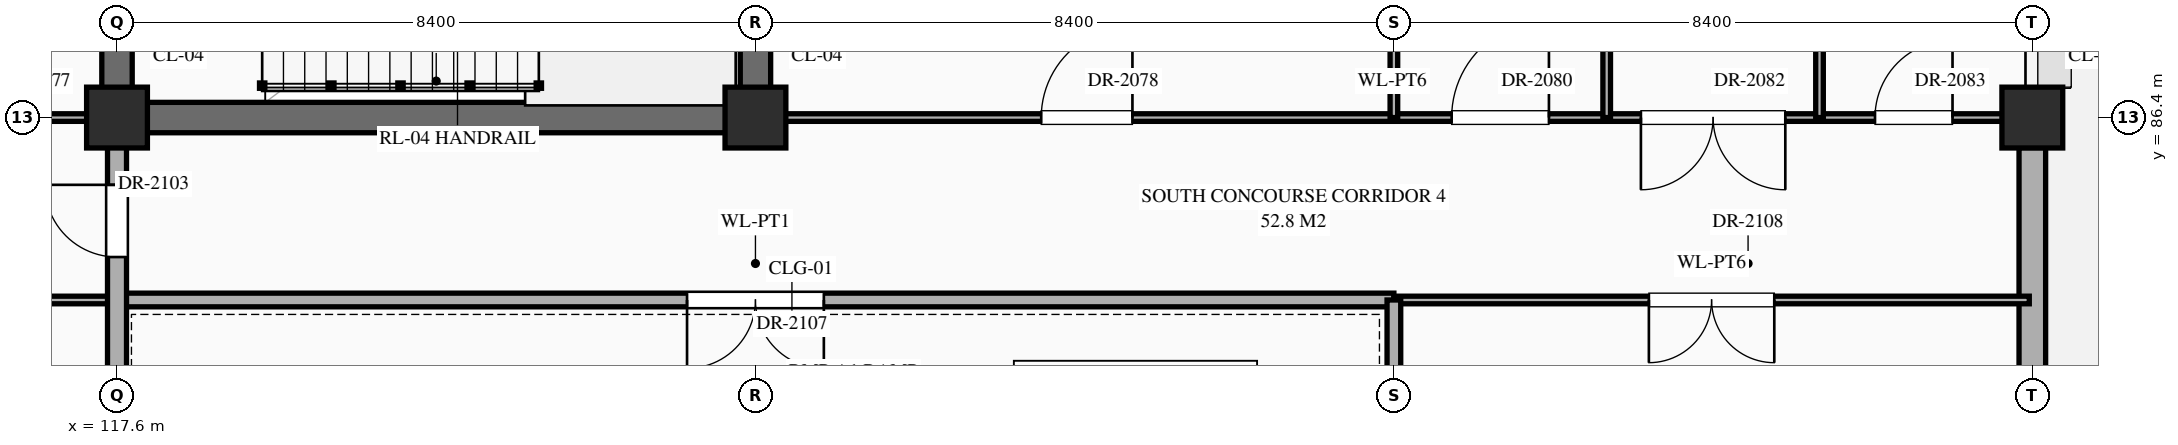
"""IFC4 building model, lengths in metres.
Left out: names, types, materials, properties, quantities, classifications, styles, units other than length and angle.
Written with IfcOpenShell. Run it as: python <this file> out.ifc"""

import sys

from ifc_helpers import new_model, si_unit, direction, frame, frame_2d, origin, origin_2d, place, context, subcontext, project, spatial, rectangle, extrude, element, fill, save


model = new_model("IFC4")
c1 = context("Model", 3, precision=1e-05, world=origin(), true_north=direction((0.0, 1.0)))
c2 = subcontext(c1, "Body", "Model", "MODEL_VIEW")
j1 = project(units=[si_unit("LENGTHUNIT", "METRE"), si_unit("PLANEANGLEUNIT", "RADIAN")], contexts=[c1])
p1 = place(None, origin())
s1 = spatial("IfcSite", under=j1, at=p1, CompositionType="ELEMENT")
p2 = place(p1, origin())
s2 = spatial("IfcBuilding", under=s1, at=p2, CompositionType="ELEMENT")
p3 = place(p2, frame((0.0, 0.0, 21.6)))
s3 = spatial("IfcBuildingStorey", under=s2, at=p3, CompositionType="ELEMENT", Elevation=21.6)
for number, where, z_axis, x_axis in (
    (1, (117.6, 86.4, 0.0), (0.0, 0.0, 1.0), (1.0, 0.0, 0.0)),
    (2, (126.0, 86.4, 0.0), (0.0, 0.0, 1.0), (1.0, 0.0, 0.0)),
    (3, (142.8, 86.4, 0.0), (0.0, 0.0, 1.0), (1.0, 0.0, 0.0)),
):
    element("IfcColumn", number, at=place(p3, frame(where, z_axis=z_axis, x_axis=x_axis)), inside=s3, PredefinedType="COLUMN", context=c2, shape_type="SweptSolid", body=[
        extrude(rectangle(XDim=0.8, YDim=0.8, at=origin_2d()), origin(), (0.0, 0.0, 1.0), 4.5),
    ])
p4 = place(p3, frame((142.8, 79.595, 0.0), z_axis=(0.0, 0.0, 1.0), x_axis=(0.0, 1.0, 0.0)))
e4 = element("IfcWall", 4, at=p4, inside=s3, PredefinedType="STANDARD", context=c2, shape_type="SweptSolid", body=[
    extrude(rectangle(XDim=6.41, YDim=0.35, at=frame_2d((3.205, 0.0))), origin(), (0.0, 0.0, 1.0), 3.59),
])
p5 = place(p4, frame((1.105, 0.0, 0.0)))
e5 = element("IfcOpeningElement", 5, at=p5, cuts=e4, PredefinedType="OPENING", context=c2, shape_type="SweptSolid", body=[
    extrude(rectangle(XDim=1.8, YDim=2.25, at=frame_2d((0.9, 1.125))), frame((0.0, 0.187, 0.0), z_axis=(0.0, -1.0, 0.0), x_axis=(1.0, 0.0, 0.0)), (0.0, 0.0, 1.0), 0.374),
])
p6 = place(p3, frame((100.8, 84.0, 0.0), z_axis=(0.0, 0.0, 1.0), x_axis=(1.0, 0.0, 0.0)))
e6 = element("IfcWall", 6, at=p6, inside=s3, PredefinedType="STANDARD", context=c2, shape_type="SweptSolid", body=[
    extrude(rectangle(XDim=16.8, YDim=0.1, at=frame_2d((8.4, 0.0))), origin(), (0.0, 0.0, 1.0), 4.24),
])
p7 = place(p6, frame((3.74, 0.0, 0.0)))
e7 = element("IfcOpeningElement", 7, at=p7, cuts=e6, PredefinedType="OPENING", context=c2, shape_type="SweptSolid", body=[
    extrude(rectangle(XDim=0.92, YDim=2.15, at=frame_2d((0.46, 1.075))), frame((0.0, 0.062, 0.0), z_axis=(0.0, -1.0, 0.0), x_axis=(1.0, 0.0, 0.0)), (0.0, 0.0, 1.0), 0.124),
])
p8 = place(p6, frame((12.12, 0.0, 0.0)))
e8 = element("IfcOpeningElement", 8, at=p8, cuts=e6, PredefinedType="OPENING", context=c2, shape_type="SweptSolid", body=[
    extrude(rectangle(XDim=0.96, YDim=2.2, at=frame_2d((0.48, 1.1))), frame((0.0, 0.062, 0.0), z_axis=(0.0, -1.0, 0.0), x_axis=(1.0, 0.0, 0.0)), (0.0, 0.0, 1.0), 0.124),
])
p9 = place(p3, frame((117.6, 84.0, 0.0), z_axis=(0.0, 0.0, 1.0), x_axis=(1.0, 0.0, 0.0)))
e9 = element("IfcWall", 9, at=p9, inside=s3, PredefinedType="STANDARD", context=c2, shape_type="SweptSolid", body=[
    extrude(rectangle(XDim=16.8, YDim=0.18, at=frame_2d((8.4, 0.0))), origin(), (0.0, 0.0, 1.0), 4.24),
])
p10 = place(p9, frame((7.5, 0.0, 0.0)))
e10 = element("IfcOpeningElement", 10, at=p10, cuts=e9, PredefinedType="OPENING", context=c2, shape_type="SweptSolid", body=[
    extrude(rectangle(XDim=1.8, YDim=2.5, at=frame_2d((0.9, 1.25))), frame((0.0, 0.102, 0.0), z_axis=(0.0, -1.0, 0.0), x_axis=(1.0, 0.0, 0.0)), (0.0, 0.0, 1.0), 0.204),
])
p11 = place(p3, frame((134.4, 84.0, 0.0), z_axis=(0.0, 0.0, 1.0), x_axis=(1.0, 0.0, 0.0)))
e11 = element("IfcWall", 11, at=p11, inside=s3, PredefinedType="STANDARD", context=c2, shape_type="SweptSolid", body=[
    extrude(rectangle(XDim=8.36, YDim=0.1, at=frame_2d((4.18, 0.0))), origin(), (0.0, 0.0, 1.0), 4.24),
])
p12 = place(p11, frame((3.355, 0.0, 0.0)))
e12 = element("IfcOpeningElement", 12, at=p12, cuts=e11, PredefinedType="OPENING", context=c2, shape_type="SweptSolid", body=[
    extrude(rectangle(XDim=1.65, YDim=2.4, at=frame_2d((0.825, 1.2))), frame((0.0, 0.062, 0.0), z_axis=(0.0, -1.0, 0.0), x_axis=(1.0, 0.0, 0.0)), (0.0, 0.0, 1.0), 0.124),
])
p13 = place(p3, frame((109.2, 86.4, 0.0), z_axis=(0.0, 0.0, 1.0), x_axis=(1.0, 0.0, 0.0)))
e13 = element("IfcWall", 13, at=p13, inside=s3, PredefinedType="STANDARD", context=c2, shape_type="SweptSolid", body=[
    extrude(rectangle(XDim=8.4, YDim=0.1, at=frame_2d((4.2, 0.0))), origin(), (0.0, 0.0, 1.0), 3.39),
])
p14 = place(p13, frame((1.04, 0.0, 0.0)))
e14 = element("IfcOpeningElement", 14, at=p14, cuts=e13, PredefinedType="OPENING", context=c2, shape_type="SweptSolid", body=[
    extrude(rectangle(XDim=1.04, YDim=2.2, at=frame_2d((0.52, 1.1))), frame((0.0, 0.062, 0.0), z_axis=(0.0, -1.0, 0.0), x_axis=(1.0, 0.0, 0.0)), (0.0, 0.0, 1.0), 0.124),
])
p15 = place(p13, frame((3.64, 0.0, 0.0)))
e15 = element("IfcOpeningElement", 15, at=p15, cuts=e13, PredefinedType="OPENING", context=c2, shape_type="SweptSolid", body=[
    extrude(rectangle(XDim=1.12, YDim=2.25, at=frame_2d((0.56, 1.125))), frame((0.0, 0.062, 0.0), z_axis=(0.0, -1.0, 0.0), x_axis=(1.0, 0.0, 0.0)), (0.0, 0.0, 1.0), 0.124),
])
p16 = place(p13, frame((6.26, 0.0, 0.0)))
e16 = element("IfcOpeningElement", 16, at=p16, cuts=e13, PredefinedType="OPENING", context=c2, shape_type="SweptSolid", body=[
    extrude(rectangle(XDim=1.16, YDim=2.3, at=frame_2d((0.58, 1.15))), frame((0.0, 0.062, 0.0), z_axis=(0.0, -1.0, 0.0), x_axis=(1.0, 0.0, 0.0)), (0.0, 0.0, 1.0), 0.124),
])
p17 = place(p3, frame((117.6, 86.4, 0.0), z_axis=(0.0, 0.0, 1.0), x_axis=(1.0, 0.0, 0.0)))
e17 = element("IfcWall", 17, at=p17, inside=s3, PredefinedType="SHEAR", context=c2, shape_type="SweptSolid", body=[
    extrude(rectangle(XDim=8.4, YDim=0.4, at=frame_2d((4.2, 0.0))), origin(), (0.0, 0.0, 1.0), 4.24),
])
p18 = place(p3, frame((126.0, 86.4, 0.0), z_axis=(0.0, 0.0, 1.0), x_axis=(1.0, 0.0, 0.0)))
e18 = element("IfcWall", 18, at=p18, inside=s3, PredefinedType="STANDARD", context=c2, shape_type="SweptSolid", body=[
    extrude(rectangle(XDim=16.76, YDim=0.1, at=frame_2d((8.38, 0.0))), origin(), (0.0, 0.0, 1.0), 3.19),
])
p19 = place(p18, frame((3.76, 0.0, 0.0)))
e19 = element("IfcOpeningElement", 19, at=p19, cuts=e18, PredefinedType="OPENING", context=c2, shape_type="SweptSolid", body=[
    extrude(rectangle(XDim=1.2, YDim=2.35, at=frame_2d((0.6, 1.175))), frame((0.0, 0.062, 0.0), z_axis=(0.0, -1.0, 0.0), x_axis=(1.0, 0.0, 0.0)), (0.0, 0.0, 1.0), 0.124),
])
p20 = place(p18, frame((9.16, 0.0, 0.0)))
e20 = element("IfcOpeningElement", 20, at=p20, cuts=e18, PredefinedType="OPENING", context=c2, shape_type="SweptSolid", body=[
    extrude(rectangle(XDim=1.28, YDim=2.35, at=frame_2d((0.64, 1.175))), frame((0.0, 0.062, 0.0), z_axis=(0.0, -1.0, 0.0), x_axis=(1.0, 0.0, 0.0)), (0.0, 0.0, 1.0), 0.124),
])
p21 = place(p18, frame((11.65, 0.0, 0.0)))
e21 = element("IfcOpeningElement", 21, at=p21, cuts=e18, PredefinedType="OPENING", context=c2, shape_type="SweptSolid", body=[
    extrude(rectangle(XDim=1.9, YDim=2.5, at=frame_2d((0.95, 1.25))), frame((0.0, 0.062, 0.0), z_axis=(0.0, -1.0, 0.0), x_axis=(1.0, 0.0, 0.0)), (0.0, 0.0, 1.0), 0.124),
])
p22 = place(p18, frame((14.73, 0.0, 0.0)))
e22 = element("IfcOpeningElement", 22, at=p22, cuts=e18, PredefinedType="OPENING", context=c2, shape_type="SweptSolid", body=[
    extrude(rectangle(XDim=1.02, YDim=2.4, at=frame_2d((0.51, 1.2))), frame((0.0, 0.062, 0.0), z_axis=(0.0, -1.0, 0.0), x_axis=(1.0, 0.0, 0.0)), (0.0, 0.0, 1.0), 0.124),
])
p23 = place(p3, frame((117.6, 79.24, 0.0), z_axis=(0.0, 0.0, 1.0), x_axis=(0.0, 1.0, 0.0)))
e23 = element("IfcWall", 23, at=p23, inside=s3, PredefinedType="STANDARD", context=c2, shape_type="SweptSolid", body=[
    extrude(rectangle(XDim=7.16, YDim=0.25, at=frame_2d((3.58, 0.0))), origin(), (0.0, 0.0, 1.0), 3.49),
])
p24 = place(p23, frame((5.325, 0.0, 0.0)))
e24 = element("IfcOpeningElement", 24, at=p24, cuts=e23, PredefinedType="OPENING", context=c2, shape_type="SweptSolid", body=[
    extrude(rectangle(XDim=0.95, YDim=2.15, at=frame_2d((0.475, 1.075))), frame((0.0, 0.137, 0.0), z_axis=(0.0, -1.0, 0.0), x_axis=(1.0, 0.0, 0.0)), (0.0, 0.0, 1.0), 0.274),
])
for number, where, z_axis, x_axis in (
    (25, (117.6, 86.4, 0.0), (0.0, 0.0, 1.0), (0.0, 1.0, 0.0)),
    (26, (126.0, 86.4, 0.0), (0.0, 0.0, 1.0), (0.0, 1.0, 0.0)),
):
    element("IfcWall", number, at=place(p3, frame(where, z_axis=z_axis, x_axis=x_axis)), inside=s3, PredefinedType="SHEAR", context=c2, shape_type="SweptSolid", body=[
        extrude(rectangle(XDim=4.8, YDim=0.4, at=frame_2d((2.4, 0.0))), origin(), (0.0, 0.0, 1.0), 4.24),
    ])
p25 = place(p3, frame((134.4, 79.24, 0.0), z_axis=(0.0, 0.0, 1.0), x_axis=(0.0, 1.0, 0.0)))
e27 = element("IfcWall", 27, at=p25, inside=s3, PredefinedType="STANDARD", context=c2, shape_type="SweptSolid", body=[
    extrude(rectangle(XDim=4.76, YDim=0.18, at=frame_2d((2.38, 0.0))), origin(), (0.0, 0.0, 1.0), 4.24),
])
p26 = place(p25, frame((1.67, 0.0, 0.0)))
e28 = element("IfcOpeningElement", 28, at=p26, cuts=e27, PredefinedType="OPENING", context=c2, shape_type="SweptSolid", body=[
    extrude(rectangle(XDim=1.7, YDim=2.45, at=frame_2d((0.85, 1.225))), frame((0.0, 0.102, 0.0), z_axis=(0.0, -1.0, 0.0), x_axis=(1.0, 0.0, 0.0)), (0.0, 0.0, 1.0), 0.204),
])
p27 = place(p3, frame((134.4, 86.4, 0.0), z_axis=(0.0, 0.0, 1.0), x_axis=(0.0, 1.0, 0.0)))
e29 = element("IfcWall", 29, at=p27, inside=s3, PredefinedType="STANDARD", context=c2, shape_type="SweptSolid", body=[
    extrude(rectangle(XDim=7.2, YDim=0.1, at=frame_2d((3.6, 0.0))), origin(), (0.0, 0.0, 1.0), 4.24),
])
p28 = place(p3, frame((137.2, 86.4, 0.0), z_axis=(0.0, 0.0, 1.0), x_axis=(0.0, 1.0, 0.0)))
e30 = element("IfcWall", 30, at=p28, inside=s3, PredefinedType="STANDARD", context=c2, shape_type="SweptSolid", body=[
    extrude(rectangle(XDim=7.2, YDim=0.1, at=frame_2d((3.6, 0.0))), origin(), (0.0, 0.0, 1.0), 4.24),
])
p29 = place(p28, frame((2.98, 0.0, 0.0)))
e31 = element("IfcOpeningElement", 31, at=p29, cuts=e30, PredefinedType="OPENING", context=c2, shape_type="SweptSolid", body=[
    extrude(rectangle(XDim=1.24, YDim=2.3, at=frame_2d((0.62, 1.15))), frame((0.0, 0.062, 0.0), z_axis=(0.0, -1.0, 0.0), x_axis=(1.0, 0.0, 0.0)), (0.0, 0.0, 1.0), 0.124),
])
p30 = place(p3, frame((140.0, 86.4, 0.0), z_axis=(0.0, 0.0, 1.0), x_axis=(0.0, 1.0, 0.0)))
e32 = element("IfcWall", 32, at=p30, inside=s3, PredefinedType="STANDARD", context=c2, shape_type="SweptSolid", body=[
    extrude(rectangle(XDim=7.2, YDim=0.1, at=frame_2d((3.6, 0.0))), origin(), (0.0, 0.0, 1.0), 4.24),
])
p31 = place(p30, frame((3.13, 0.0, 0.0)))
e33 = element("IfcOpeningElement", 33, at=p31, cuts=e32, PredefinedType="OPENING", context=c2, shape_type="SweptSolid", body=[
    extrude(rectangle(XDim=0.94, YDim=2.3, at=frame_2d((0.47, 1.15))), frame((0.0, 0.062, 0.0), z_axis=(0.0, -1.0, 0.0), x_axis=(1.0, 0.0, 0.0)), (0.0, 0.0, 1.0), 0.124),
])
p32 = place(p19, origin())
e34 = element("IfcDoor", 34, at=p32, inside=s3, OperationType="SINGLE_SWING_RIGHT", PredefinedType="DOOR", context=c2, shape_type="SweptSolid", body=[
    extrude(rectangle(XDim=1.2, YDim=2.35, at=frame_2d((0.6, 1.175))), frame((0.0, 0.025, 0.0), z_axis=(0.0, -1.0, 0.0), x_axis=(1.0, 0.0, 0.0)), (0.0, 0.0, 1.0), 0.05),
])
fill(e19, e34)
p33 = place(p20, origin())
e35 = element("IfcDoor", 35, at=p33, inside=s3, OperationType="SINGLE_SWING_RIGHT", PredefinedType="DOOR", context=c2, shape_type="SweptSolid", body=[
    extrude(rectangle(XDim=1.28, YDim=2.35, at=frame_2d((0.64, 1.175))), frame((0.0, 0.025, 0.0), z_axis=(0.0, -1.0, 0.0), x_axis=(1.0, 0.0, 0.0)), (0.0, 0.0, 1.0), 0.05),
])
fill(e20, e35)
p34 = place(p21, frame((1.9, 0.0, 0.0), z_axis=(0.0, 0.0, 1.0), x_axis=(-1.0, 0.0, 0.0)))
e36 = element("IfcDoor", 36, at=p34, inside=s3, OperationType="DOUBLE_DOOR_SINGLE_SWING", PredefinedType="DOOR", context=c2, shape_type="SweptSolid", body=[
    extrude(rectangle(XDim=1.9, YDim=2.5, at=frame_2d((0.95, 1.25))), frame((0.0, 0.025, 0.0), z_axis=(0.0, -1.0, 0.0), x_axis=(1.0, 0.0, 0.0)), (0.0, 0.0, 1.0), 0.05),
])
fill(e21, e36)
p35 = place(p22, origin())
e37 = element("IfcDoor", 37, at=p35, inside=s3, OperationType="SINGLE_SWING_RIGHT", PredefinedType="DOOR", context=c2, shape_type="SweptSolid", body=[
    extrude(rectangle(XDim=1.02, YDim=2.4, at=frame_2d((0.51, 1.2))), frame((0.0, 0.025, 0.0), z_axis=(0.0, -1.0, 0.0), x_axis=(1.0, 0.0, 0.0)), (0.0, 0.0, 1.0), 0.05),
])
fill(e22, e37)
p36 = place(p24, origin())
e38 = element("IfcDoor", 38, at=p36, inside=s3, OperationType="SINGLE_SWING_RIGHT", PredefinedType="DOOR", context=c2, shape_type="SweptSolid", body=[
    extrude(rectangle(XDim=0.95, YDim=2.15, at=frame_2d((0.475, 1.075))), frame((0.0, 0.025, 0.0), z_axis=(0.0, -1.0, 0.0), x_axis=(1.0, 0.0, 0.0)), (0.0, 0.0, 1.0), 0.05),
])
fill(e24, e38)
p37 = place(p10, frame((1.8, 0.0, 0.0), z_axis=(0.0, 0.0, 1.0), x_axis=(-1.0, 0.0, 0.0)))
e39 = element("IfcDoor", 39, at=p37, inside=s3, OperationType="DOUBLE_DOOR_SINGLE_SWING", PredefinedType="DOOR", context=c2, shape_type="SweptSolid", body=[
    extrude(rectangle(XDim=1.8, YDim=2.5, at=frame_2d((0.9, 1.25))), frame((0.0, 0.025, 0.0), z_axis=(0.0, -1.0, 0.0), x_axis=(1.0, 0.0, 0.0)), (0.0, 0.0, 1.0), 0.05),
])
fill(e10, e39)
p38 = place(p12, frame((1.65, 0.0, 0.0), z_axis=(0.0, 0.0, 1.0), x_axis=(-1.0, 0.0, 0.0)))
e40 = element("IfcDoor", 40, at=p38, inside=s3, OperationType="DOUBLE_DOOR_SINGLE_SWING", PredefinedType="DOOR", context=c2, shape_type="SweptSolid", body=[
    extrude(rectangle(XDim=1.65, YDim=2.4, at=frame_2d((0.825, 1.2))), frame((0.0, 0.025, 0.0), z_axis=(0.0, -1.0, 0.0), x_axis=(1.0, 0.0, 0.0)), (0.0, 0.0, 1.0), 0.05),
])
fill(e12, e40)
save(model, sys.argv[1])
